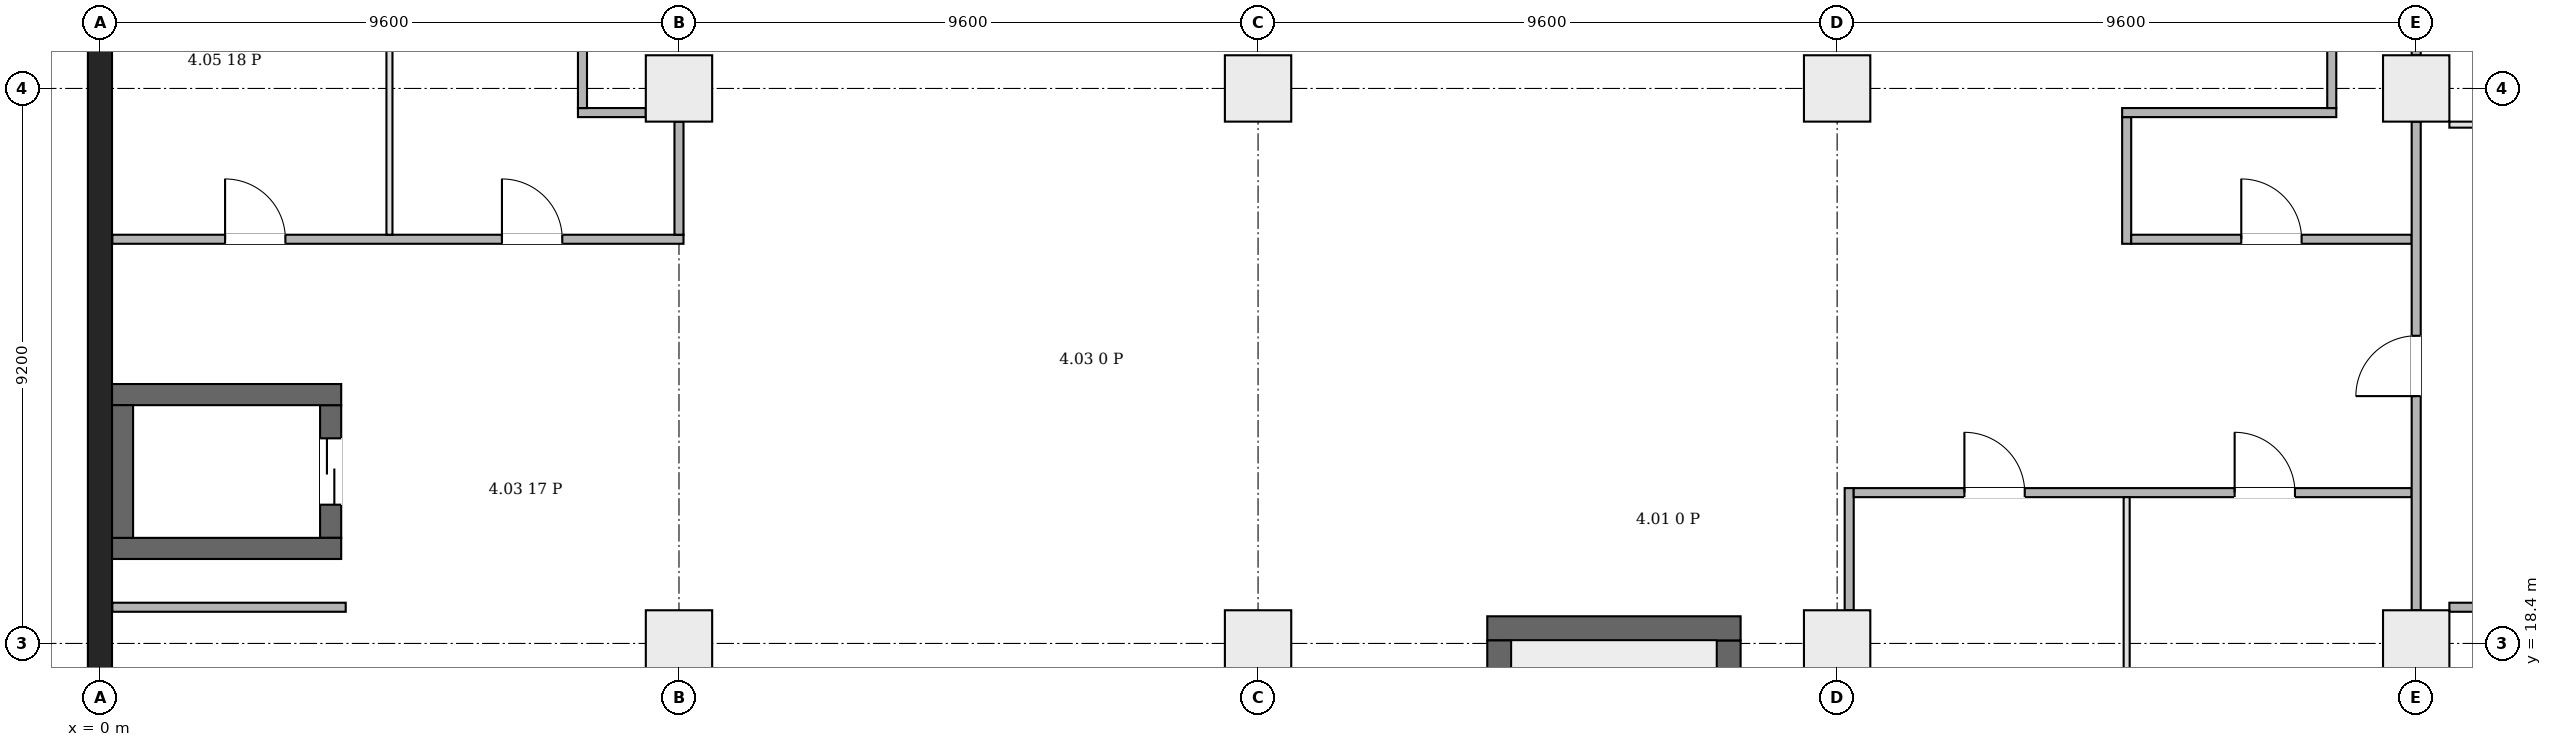
"""IFC4 building model, lengths in metres.
Left out: names, types, materials, properties, quantities, classifications, styles, units other than length and angle.
Written with IfcOpenShell. Run it as: python <this file> out.ifc"""

import sys

from ifc_helpers import new_model, si_unit, direction, frame, frame_2d, origin, origin_2d, place, context, subcontext, project, spatial, rectangle, extrude, element, fill, save


model = new_model("IFC4")
c1 = context("Model", 3, precision=1e-05, world=origin(), true_north=direction((0.0, 1.0)))
c2 = subcontext(c1, "Body", "Model", "MODEL_VIEW")
j1 = project(units=[si_unit("LENGTHUNIT", "METRE"), si_unit("PLANEANGLEUNIT", "RADIAN")], contexts=[c1])
p1 = place(None, origin())
s1 = spatial("IfcSite", under=j1, at=p1, CompositionType="ELEMENT")
p2 = place(p1, origin())
s2 = spatial("IfcBuilding", under=s1, at=p2, CompositionType="ELEMENT")
p3 = place(p2, frame((0.0, 0.0, 26.7)))
s3 = spatial("IfcBuildingStorey", under=s2, at=p3, CompositionType="ELEMENT", Elevation=26.7)
p4 = place(p3, frame((0.0, -0.2, 0.0), z_axis=(0.0, 0.0, 1.0), x_axis=(0.0, 1.0, 0.0)))
e1 = element("IfcWall", 1, at=p4, inside=s3, PredefinedType="SHEAR", context=c2, shape_type="SweptSolid", body=[
    extrude(rectangle(XDim=46.88, YDim=0.4, at=frame_2d((23.44, 0.0))), origin(), (0.0, 0.0, 1.0), 5.2),
])
p5 = place(p3, frame((23.0, 18.65, 0.0), z_axis=(0.0, 0.0, 1.0), x_axis=(1.0, 0.0, 0.0)))
e2 = element("IfcWall", 2, at=p5, inside=s3, PredefinedType="SHEAR", context=c2, shape_type="SweptSolid", body=[
    extrude(rectangle(XDim=4.2, YDim=0.4, at=frame_2d((2.1, 0.0))), origin(), (0.0, 0.0, 1.0), 5.2),
])
for number, where, z_axis, x_axis in (
    (3, (23.2, 11.85, 0.0), (0.0, 0.0, 1.0), (0.0, 1.0, 0.0)),
    (4, (27.0, 11.85, 0.0), (0.0, 0.0, 1.0), (0.0, 1.0, 0.0)),
):
    element("IfcWall", number, at=place(p3, frame(where, z_axis=z_axis, x_axis=x_axis)), inside=s3, PredefinedType="SHEAR", context=c2, shape_type="SweptSolid", body=[
        extrude(rectangle(XDim=6.6, YDim=0.4, at=frame_2d((3.3, 0.0))), origin(), (0.0, 0.0, 1.0), 5.2),
    ])
for number, where, z_axis, x_axis in (
    (5, (0.2, 19.975, 0.0), (0.0, 0.0, 1.0), (1.0, 0.0, 0.0)),
    (6, (0.2, 22.525, 0.0), (0.0, 0.0, 1.0), (1.0, 0.0, 0.0)),
):
    element("IfcWall", number, at=place(p3, frame(where, z_axis=z_axis, x_axis=x_axis)), inside=s3, PredefinedType="SHEAR", context=c2, shape_type="SweptSolid", body=[
        extrude(rectangle(XDim=3.8, YDim=0.35, at=frame_2d((1.9, 0.0))), origin(), (0.0, 0.0, 1.0), 5.2),
    ])
p6 = place(p3, frame((0.375, 20.15, 0.0), z_axis=(0.0, 0.0, 1.0), x_axis=(0.0, 1.0, 0.0)))
e7 = element("IfcWall", 7, at=p6, inside=s3, PredefinedType="SHEAR", context=c2, shape_type="SweptSolid", body=[
    extrude(rectangle(XDim=2.2, YDim=0.35, at=frame_2d((1.1, 0.0))), origin(), (0.0, 0.0, 1.0), 5.2),
])
p7 = place(p3, frame((3.825, 20.15, 0.0), z_axis=(0.0, 0.0, 1.0), x_axis=(0.0, 1.0, 0.0)))
e8 = element("IfcWall", 8, at=p7, inside=s3, PredefinedType="SHEAR", context=c2, shape_type="SweptSolid", body=[
    extrude(rectangle(XDim=2.2, YDim=0.35, at=frame_2d((1.1, 0.0))), origin(), (0.0, 0.0, 1.0), 5.2),
])
p8 = place(p7, frame((0.55, 0.0, 0.0)))
e9 = element("IfcOpeningElement", 9, at=p8, cuts=e8, PredefinedType="OPENING", context=c2, shape_type="SweptSolid", body=[
    extrude(rectangle(XDim=1.1, YDim=2.1, at=frame_2d((0.55, 1.05))), frame((0.0, 0.185, 0.0), z_axis=(0.0, -1.0, 0.0), x_axis=(1.0, 0.0, 0.0)), (0.0, 0.0, 1.0), 0.37),
])
for number, where, z_axis, x_axis in (
    (10, (9.6, 18.4, 0.0), (0.0, 0.0, 1.0), (1.0, 0.0, 0.0)),
    (11, (19.2, 18.4, 0.0), (0.0, 0.0, 1.0), (1.0, 0.0, 0.0)),
    (12, (28.8, 18.4, 0.0), (0.0, 0.0, 1.0), (1.0, 0.0, 0.0)),
    (13, (38.4, 18.4, 0.0), (0.0, 0.0, 1.0), (1.0, 0.0, 0.0)),
    (14, (9.6, 27.6, 0.0), (0.0, 0.0, 1.0), (1.0, 0.0, 0.0)),
    (15, (19.2, 27.6, 0.0), (0.0, 0.0, 1.0), (1.0, 0.0, 0.0)),
    (16, (28.8, 27.6, 0.0), (0.0, 0.0, 1.0), (1.0, 0.0, 0.0)),
    (17, (38.4, 27.6, 0.0), (0.0, 0.0, 1.0), (1.0, 0.0, 0.0)),
):
    element("IfcColumn", number, at=place(p3, frame(where, z_axis=z_axis, x_axis=x_axis)), inside=s3, PredefinedType="COLUMN", context=c2, shape_type="SweptSolid", body=[
        extrude(rectangle(XDim=1.1, YDim=1.1, at=origin_2d()), origin(), (0.0, 0.0, 1.0), 5.2),
    ])
p9 = place(p3, frame((0.206, 19.0, 0.0), z_axis=(0.0, 0.0, 1.0), x_axis=(1.0, 0.0, 0.0)))
e18 = element("IfcWall", 18, at=p9, inside=s3, PredefinedType="PARTITIONING", context=c2, shape_type="SweptSolid", body=[
    extrude(rectangle(XDim=3.869, YDim=0.15, at=frame_2d((1.935, 0.0))), origin(), (0.0, 0.0, 1.0), 4.85),
])
p10 = place(p3, frame((0.206, 25.1, 0.0), z_axis=(0.0, 0.0, 1.0), x_axis=(1.0, 0.0, 0.0)))
e19 = element("IfcWall", 19, at=p10, inside=s3, PredefinedType="PARTITIONING", context=c2, shape_type="SweptSolid", body=[
    extrude(rectangle(XDim=9.469, YDim=0.15, at=frame_2d((4.734, 0.0))), origin(), (0.0, 0.0, 1.0), 4.85),
])
p11 = place(p10, frame((1.869, 0.0, 0.0)))
e20 = element("IfcOpeningElement", 20, at=p11, cuts=e19, PredefinedType="OPENING", context=c2, shape_type="SweptSolid", body=[
    extrude(rectangle(XDim=1.0, YDim=2.1, at=frame_2d((0.5, 1.05))), frame((0.0, 0.085, 0.0), z_axis=(0.0, -1.0, 0.0), x_axis=(1.0, 0.0, 0.0)), (0.0, 0.0, 1.0), 0.17),
])
p12 = place(p10, frame((6.459, 0.0, 0.0)))
e21 = element("IfcOpeningElement", 21, at=p12, cuts=e19, PredefinedType="OPENING", context=c2, shape_type="SweptSolid", body=[
    extrude(rectangle(XDim=1.0, YDim=2.1, at=frame_2d((0.5, 1.05))), frame((0.0, 0.085, 0.0), z_axis=(0.0, -1.0, 0.0), x_axis=(1.0, 0.0, 0.0)), (0.0, 0.0, 1.0), 0.17),
])
p13 = place(p3, frame((4.8, 25.175, 0.0), z_axis=(0.0, 0.0, 1.0), x_axis=(0.0, 1.0, 0.0)))
e22 = element("IfcWall", 22, at=p13, inside=s3, PredefinedType="PARTITIONING", context=c2, shape_type="SweptSolid", body=[
    extrude(rectangle(XDim=9.4, YDim=0.1, at=frame_2d((4.7, 0.0))), origin(), (0.0, 0.0, 1.0), 4.85),
])
p14 = place(p3, frame((7.925, 27.2, 0.0), z_axis=(0.0, 0.0, 1.0), x_axis=(1.0, 0.0, 0.0)))
e23 = element("IfcWall", 23, at=p14, inside=s3, PredefinedType="PARTITIONING", context=c2, shape_type="SweptSolid", body=[
    extrude(rectangle(XDim=1.125, YDim=0.15, at=frame_2d((0.562, 0.0))), origin(), (0.0, 0.0, 1.0), 4.85),
])
p15 = place(p3, frame((8.0, 27.275, 0.0), z_axis=(0.0, 0.0, 1.0), x_axis=(0.0, 1.0, 0.0)))
e24 = element("IfcWall", 24, at=p15, inside=s3, PredefinedType="PARTITIONING", context=c2, shape_type="SweptSolid", body=[
    extrude(rectangle(XDim=3.65, YDim=0.15, at=frame_2d((1.825, 0.0))), origin(), (0.0, 0.0, 1.0), 4.85),
])
p16 = place(p3, frame((9.6, 25.175, 0.0), z_axis=(0.0, 0.0, 1.0), x_axis=(0.0, 1.0, 0.0)))
e25 = element("IfcWall", 25, at=p16, inside=s3, PredefinedType="PARTITIONING", context=c2, shape_type="SweptSolid", body=[
    extrude(rectangle(XDim=1.875, YDim=0.15, at=frame_2d((0.938, 0.0))), origin(), (0.0, 0.0, 1.0), 4.45),
])
p17 = place(p3, frame((29.0, 18.95, 0.0), z_axis=(0.0, 0.0, 1.0), x_axis=(0.0, 1.0, 0.0)))
e26 = element("IfcWall", 26, at=p17, inside=s3, PredefinedType="PARTITIONING", context=c2, shape_type="SweptSolid", body=[
    extrude(rectangle(XDim=2.025, YDim=0.15, at=frame_2d((1.013, 0.0))), origin(), (0.0, 0.0, 1.0), 4.45),
])
p18 = place(p3, frame((29.075, 20.9, 0.0), z_axis=(0.0, 0.0, 1.0), x_axis=(1.0, 0.0, 0.0)))
e27 = element("IfcWall", 27, at=p18, inside=s3, PredefinedType="PARTITIONING", context=c2, shape_type="SweptSolid", body=[
    extrude(rectangle(XDim=9.25, YDim=0.15, at=frame_2d((4.625, 0.0))), origin(), (0.0, 0.0, 1.0), 4.85),
])
p19 = place(p18, frame((1.835, 0.0, 0.0)))
e28 = element("IfcOpeningElement", 28, at=p19, cuts=e27, PredefinedType="OPENING", context=c2, shape_type="SweptSolid", body=[
    extrude(rectangle(XDim=1.0, YDim=2.1, at=frame_2d((0.5, 1.05))), frame((0.0, 0.085, 0.0), z_axis=(0.0, -1.0, 0.0), x_axis=(1.0, 0.0, 0.0)), (0.0, 0.0, 1.0), 0.17),
])
p20 = place(p18, frame((6.315, 0.0, 0.0)))
e29 = element("IfcOpeningElement", 29, at=p20, cuts=e27, PredefinedType="OPENING", context=c2, shape_type="SweptSolid", body=[
    extrude(rectangle(XDim=1.0, YDim=2.1, at=frame_2d((0.5, 1.05))), frame((0.0, 0.085, 0.0), z_axis=(0.0, -1.0, 0.0), x_axis=(1.0, 0.0, 0.0)), (0.0, 0.0, 1.0), 0.17),
])
p21 = place(p3, frame((33.6, 25.025, 0.0), z_axis=(0.0, 0.0, 1.0), x_axis=(0.0, 1.0, 0.0)))
e30 = element("IfcWall", 30, at=p21, inside=s3, PredefinedType="PARTITIONING", context=c2, shape_type="SweptSolid", body=[
    extrude(rectangle(XDim=2.1, YDim=0.15, at=frame_2d((1.05, 0.0))), origin(), (0.0, 0.0, 1.0), 4.85),
])
p22 = place(p3, frame((33.525, 27.2, 0.0), z_axis=(0.0, 0.0, 1.0), x_axis=(1.0, 0.0, 0.0)))
e31 = element("IfcWall", 31, at=p22, inside=s3, PredefinedType="PARTITIONING", context=c2, shape_type="SweptSolid", body=[
    extrude(rectangle(XDim=3.55, YDim=0.15, at=frame_2d((1.775, 0.0))), origin(), (0.0, 0.0, 1.0), 4.85),
])
p23 = place(p3, frame((33.6, 11.575, 0.0), z_axis=(0.0, 0.0, 1.0), x_axis=(0.0, 1.0, 0.0)))
e32 = element("IfcWall", 32, at=p23, inside=s3, PredefinedType="PARTITIONING", context=c2, shape_type="SweptSolid", body=[
    extrude(rectangle(XDim=9.25, YDim=0.1, at=frame_2d((4.625, 0.0))), origin(), (0.0, 0.0, 1.0), 4.85),
])
p24 = place(p3, frame((33.675, 25.1, 0.0), z_axis=(0.0, 0.0, 1.0), x_axis=(1.0, 0.0, 0.0)))
e33 = element("IfcWall", 33, at=p24, inside=s3, PredefinedType="PARTITIONING", context=c2, shape_type="SweptSolid", body=[
    extrude(rectangle(XDim=4.65, YDim=0.15, at=frame_2d((2.325, 0.0))), origin(), (0.0, 0.0, 1.0), 4.85),
])
p25 = place(p24, frame((1.825, 0.0, 0.0)))
e34 = element("IfcOpeningElement", 34, at=p25, cuts=e33, PredefinedType="OPENING", context=c2, shape_type="SweptSolid", body=[
    extrude(rectangle(XDim=1.0, YDim=2.1, at=frame_2d((0.5, 1.05))), frame((0.0, 0.085, 0.0), z_axis=(0.0, -1.0, 0.0), x_axis=(1.0, 0.0, 0.0)), (0.0, 0.0, 1.0), 0.17),
])
p26 = place(p3, frame((37.0, 27.275, 0.0), z_axis=(0.0, 0.0, 1.0), x_axis=(0.0, 1.0, 0.0)))
e35 = element("IfcWall", 35, at=p26, inside=s3, PredefinedType="PARTITIONING", context=c2, shape_type="SweptSolid", body=[
    extrude(rectangle(XDim=3.65, YDim=0.15, at=frame_2d((1.825, 0.0))), origin(), (0.0, 0.0, 1.0), 4.85),
])
p27 = place(p3, frame((38.4, 18.95, 0.0), z_axis=(0.0, 0.0, 1.0), x_axis=(0.0, 1.0, 0.0)))
e36 = element("IfcWall", 36, at=p27, inside=s3, PredefinedType="PARTITIONING", context=c2, shape_type="SweptSolid", body=[
    extrude(rectangle(XDim=8.1, YDim=0.15, at=frame_2d((4.05, 0.0))), origin(), (0.0, 0.0, 1.0), 4.45),
])
p28 = place(p27, frame((3.55, 0.0, 0.0)))
e37 = element("IfcOpeningElement", 37, at=p28, cuts=e36, PredefinedType="OPENING", context=c2, shape_type="SweptSolid", body=[
    extrude(rectangle(XDim=1.0, YDim=2.1, at=frame_2d((0.5, 1.05))), frame((0.0, 0.085, 0.0), z_axis=(0.0, -1.0, 0.0), x_axis=(1.0, 0.0, 0.0)), (0.0, 0.0, 1.0), 0.17),
])
p29 = place(p3, frame((38.4, 28.15, 0.0), z_axis=(0.0, 0.0, 1.0), x_axis=(0.0, 1.0, 0.0)))
e38 = element("IfcWall", 38, at=p29, inside=s3, PredefinedType="PARTITIONING", context=c2, shape_type="SweptSolid", body=[
    extrude(rectangle(XDim=6.425, YDim=0.15, at=frame_2d((3.212, 0.0))), origin(), (0.0, 0.0, 1.0), 4.45),
])
p30 = place(p3, frame((38.95, 19.0, 0.0), z_axis=(0.0, 0.0, 1.0), x_axis=(1.0, 0.0, 0.0)))
e39 = element("IfcWall", 39, at=p30, inside=s3, PredefinedType="PARTITIONING", context=c2, shape_type="SweptSolid", body=[
    extrude(rectangle(XDim=8.5, YDim=0.15, at=frame_2d((4.25, 0.0))), origin(), (0.0, 0.0, 1.0), 4.85),
])
p31 = place(p3, frame((38.95, 27.0, 0.0), z_axis=(0.0, 0.0, 1.0), x_axis=(1.0, 0.0, 0.0)))
e40 = element("IfcWall", 40, at=p31, inside=s3, PredefinedType="PARTITIONING", context=c2, shape_type="SweptSolid", body=[
    extrude(rectangle(XDim=8.5, YDim=0.1, at=frame_2d((4.25, 0.0))), origin(), (0.0, 0.0, 1.0), 4.85),
])
p32 = place(p8, origin())
e41 = element("IfcDoor", 41, at=p32, inside=s3, OperationType="DOUBLE_DOOR_SLIDING", PredefinedType="DOOR", context=c2, shape_type="SweptSolid", body=[
    extrude(rectangle(XDim=1.1, YDim=2.1, at=frame_2d((0.55, 1.05))), frame((0.0, 0.025, 0.0), z_axis=(0.0, -1.0, 0.0), x_axis=(1.0, 0.0, 0.0)), (0.0, 0.0, 1.0), 0.05),
])
fill(e9, e41)
p33 = place(p19, origin())
e42 = element("IfcDoor", 42, at=p33, inside=s3, OperationType="SINGLE_SWING_RIGHT", PredefinedType="DOOR", context=c2, shape_type="SweptSolid", body=[
    extrude(rectangle(XDim=1.0, YDim=2.1, at=frame_2d((0.5, 1.05))), frame((0.0, 0.025, 0.0), z_axis=(0.0, -1.0, 0.0), x_axis=(1.0, 0.0, 0.0)), (0.0, 0.0, 1.0), 0.05),
])
fill(e28, e42)
p34 = place(p20, origin())
e43 = element("IfcDoor", 43, at=p34, inside=s3, OperationType="SINGLE_SWING_LEFT", PredefinedType="DOOR", context=c2, shape_type="SweptSolid", body=[
    extrude(rectangle(XDim=1.0, YDim=2.1, at=frame_2d((0.5, 1.05))), frame((0.0, 0.025, 0.0), z_axis=(0.0, -1.0, 0.0), x_axis=(1.0, 0.0, 0.0)), (0.0, 0.0, 1.0), 0.05),
])
fill(e29, e43)
p35 = place(p11, origin())
e44 = element("IfcDoor", 44, at=p35, inside=s3, OperationType="SINGLE_SWING_LEFT", PredefinedType="DOOR", context=c2, shape_type="SweptSolid", body=[
    extrude(rectangle(XDim=1.0, YDim=2.1, at=frame_2d((0.5, 1.05))), frame((0.0, 0.025, 0.0), z_axis=(0.0, -1.0, 0.0), x_axis=(1.0, 0.0, 0.0)), (0.0, 0.0, 1.0), 0.05),
])
fill(e20, e44)
p36 = place(p12, origin())
e45 = element("IfcDoor", 45, at=p36, inside=s3, OperationType="SINGLE_SWING_RIGHT", PredefinedType="DOOR", context=c2, shape_type="SweptSolid", body=[
    extrude(rectangle(XDim=1.0, YDim=2.1, at=frame_2d((0.5, 1.05))), frame((0.0, 0.025, 0.0), z_axis=(0.0, -1.0, 0.0), x_axis=(1.0, 0.0, 0.0)), (0.0, 0.0, 1.0), 0.05),
])
fill(e21, e45)
p37 = place(p25, origin())
e46 = element("IfcDoor", 46, at=p37, inside=s3, OperationType="SINGLE_SWING_LEFT", PredefinedType="DOOR", context=c2, shape_type="SweptSolid", body=[
    extrude(rectangle(XDim=1.0, YDim=2.1, at=frame_2d((0.5, 1.05))), frame((0.0, 0.025, 0.0), z_axis=(0.0, -1.0, 0.0), x_axis=(1.0, 0.0, 0.0)), (0.0, 0.0, 1.0), 0.05),
])
fill(e34, e46)
p38 = place(p28, origin())
e47 = element("IfcDoor", 47, at=p38, inside=s3, OperationType="SINGLE_SWING_RIGHT", PredefinedType="DOOR", context=c2, shape_type="SweptSolid", body=[
    extrude(rectangle(XDim=1.0, YDim=2.1, at=frame_2d((0.5, 1.05))), frame((0.0, 0.025, 0.0), z_axis=(0.0, -1.0, 0.0), x_axis=(1.0, 0.0, 0.0)), (0.0, 0.0, 1.0), 0.05),
])
fill(e37, e47)
save(model, sys.argv[1])
